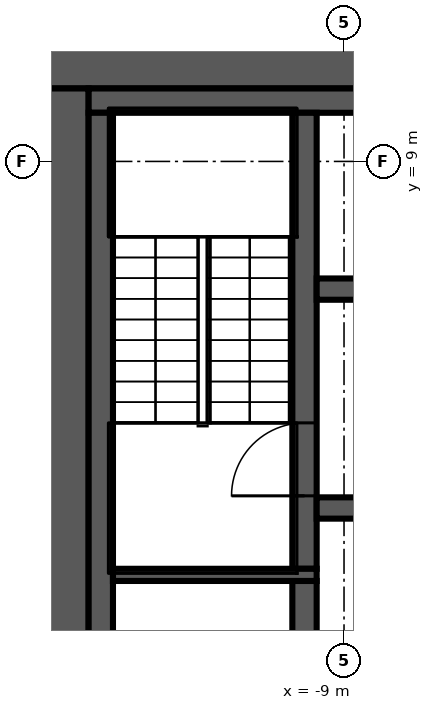
"""IFC4 building model, lengths in metres.
Left out: names, types, materials, properties, quantities, classifications, styles, units other than length and angle.
Written with IfcOpenShell. Run it as: python <this file> out.ifc"""

import sys

from ifc_helpers import new_model, si_unit, direction, frame, frame_2d, origin, place, context, subcontext, project, spatial, rectangle, extrude, element, fill, save


model = new_model("IFC4")
c1 = context("Model", 3, precision=1e-05, world=origin(), true_north=direction((0.0, 1.0)))
c2 = subcontext(c1, "Body", "Model", "MODEL_VIEW")
j1 = project(units=[si_unit("LENGTHUNIT", "METRE"), si_unit("PLANEANGLEUNIT", "RADIAN")], contexts=[c1])
p1 = place(None, origin())
s1 = spatial("IfcSite", under=j1, at=p1, CompositionType="ELEMENT")
p2 = place(p1, origin())
s2 = spatial("IfcBuilding", under=s1, at=p2, CompositionType="ELEMENT")
p3 = place(p2, frame((0.0, 0.0, 151.6)))
s3 = spatial("IfcBuildingStorey", under=s2, at=p3, CompositionType="ELEMENT", Elevation=151.6)
p4 = place(p3, frame((-14.0, 10.6, 0.0), z_axis=(0.0, 0.0, 1.0), x_axis=(1.0, 0.0, 0.0)))
e1 = element("IfcWall", 1, at=p4, inside=s3, PredefinedType="SHEAR", context=c2, shape_type="SweptSolid", body=[
    extrude(rectangle(XDim=28.0, YDim=0.8, at=frame_2d((14.0, 0.0))), origin(), (0.0, 0.0, 1.0), 6.62),
])
p5 = place(p4, frame((15.9, 0.0, 0.0)))
e2 = element("IfcOpeningElement", 2, at=p5, cuts=e1, PredefinedType="OPENING", context=c2, shape_type="SweptSolid", body=[
    extrude(rectangle(XDim=1.6, YDim=2.1, at=frame_2d((0.8, 1.05))), frame((0.0, 0.41, 0.0), z_axis=(0.0, -1.0, 0.0), x_axis=(1.0, 0.0, 0.0)), (0.0, 0.0, 1.0), 0.82),
])
p6 = place(p3, frame((-13.6, -10.2, 0.0), z_axis=(0.0, 0.0, 1.0), x_axis=(0.0, 1.0, 0.0)))
e3 = element("IfcWall", 3, at=p6, inside=s3, PredefinedType="SHEAR", context=c2, shape_type="SweptSolid", body=[
    extrude(rectangle(XDim=20.4, YDim=0.8, at=frame_2d((10.2, 0.0))), origin(), (0.0, 0.0, 1.0), 6.62),
])
p7 = place(p3, frame((-13.2, 10.0, 0.0), z_axis=(0.0, 0.0, 1.0), x_axis=(1.0, 0.0, 0.0)))
e4 = element("IfcWall", 4, at=p7, inside=s3, PredefinedType="SHEAR", context=c2, shape_type="SweptSolid", body=[
    extrude(rectangle(XDim=14.7, YDim=0.4, at=frame_2d((7.35, 0.0))), origin(), (0.0, 0.0, 1.0), 6.62),
])
p8 = place(p3, frame((-13.0, -9.8, 0.0), z_axis=(0.0, 0.0, 1.0), x_axis=(0.0, 1.0, 0.0)))
e5 = element("IfcWall", 5, at=p8, inside=s3, PredefinedType="SHEAR", context=c2, shape_type="SweptSolid", body=[
    extrude(rectangle(XDim=19.6, YDim=0.4, at=frame_2d((9.8, 0.0))), origin(), (0.0, 0.0, 1.0), 6.62),
])
p9 = place(p3, frame((-9.65, -2.1, 0.0), z_axis=(0.0, 0.0, 1.0), x_axis=(0.0, 1.0, 0.0)))
e6 = element("IfcWall", 6, at=p9, inside=s3, PredefinedType="SHEAR", context=c2, shape_type="SweptSolid", body=[
    extrude(rectangle(XDim=4.2, YDim=0.4, at=frame_2d((2.1, 0.0))), origin(), (0.0, 0.0, 1.0), 6.62),
])
p10 = place(p3, frame((-9.65, 2.3, 0.0), z_axis=(0.0, 0.0, 1.0), x_axis=(0.0, 1.0, 0.0)))
e7 = element("IfcWall", 7, at=p10, inside=s3, PredefinedType="SHEAR", context=c2, shape_type="SweptSolid", body=[
    extrude(rectangle(XDim=7.5, YDim=0.4, at=frame_2d((3.75, 0.0))), origin(), (0.0, 0.0, 1.0), 6.62),
])
p11 = place(p10, frame((1.2, 0.0, 0.0)))
e8 = element("IfcOpeningElement", 8, at=p11, cuts=e7, PredefinedType="OPENING", context=c2, shape_type="SweptSolid", body=[
    extrude(rectangle(XDim=1.2, YDim=2.1, at=frame_2d((0.6, 1.05))), frame((0.0, 0.21, 0.0), z_axis=(0.0, -1.0, 0.0), x_axis=(1.0, 0.0, 0.0)), (0.0, 0.0, 1.0), 0.42),
])
p12 = place(p3, frame((-9.45, 2.2, 0.0), z_axis=(0.0, 0.0, 1.0), x_axis=(-1.0, 0.0, 0.0)))
e9 = element("IfcWall", 9, at=p12, inside=s3, PredefinedType="SHEAR", context=c2, shape_type="SweptSolid", body=[
    extrude(rectangle(XDim=3.35, YDim=0.2, at=frame_2d((1.675, 0.0))), origin(), (0.0, 0.0, 1.0), 6.62),
])
p13 = place(p3, frame((-9.45, 6.9, 0.0), z_axis=(0.0, 0.0, 1.0), x_axis=(1.0, 0.0, 0.0)))
e10 = element("IfcWall", 10, at=p13, inside=s3, PredefinedType="SHEAR", context=c2, shape_type="SweptSolid", body=[
    extrude(rectangle(XDim=18.9, YDim=0.35, at=frame_2d((9.45, 0.0))), origin(), (0.0, 0.0, 1.0), 6.62),
])
p14 = place(p13, frame((11.55, 0.0, 0.0)))
e11 = element("IfcOpeningElement", 11, at=p14, cuts=e10, PredefinedType="OPENING", context=c2, shape_type="SweptSolid", body=[
    extrude(rectangle(XDim=1.2, YDim=2.1, at=frame_2d((0.6, 1.05))), frame((0.0, 0.185, 0.0), z_axis=(0.0, -1.0, 0.0), x_axis=(1.0, 0.0, 0.0)), (0.0, 0.0, 1.0), 0.37),
])
p15 = place(p13, frame((14.3, 0.0, 0.0)))
e12 = element("IfcOpeningElement", 12, at=p15, cuts=e10, PredefinedType="OPENING", context=c2, shape_type="SweptSolid", body=[
    extrude(rectangle(XDim=1.1, YDim=2.1, at=frame_2d((0.55, 1.05))), frame((0.0, 0.185, 0.0), z_axis=(0.0, -1.0, 0.0), x_axis=(1.0, 0.0, 0.0)), (0.0, 0.0, 1.0), 0.37),
])
p16 = place(p13, frame((17.0, 0.0, 0.0)))
e13 = element("IfcOpeningElement", 13, at=p16, cuts=e10, PredefinedType="OPENING", context=c2, shape_type="SweptSolid", body=[
    extrude(rectangle(XDim=1.1, YDim=2.1, at=frame_2d((0.55, 1.05))), frame((0.0, 0.185, 0.0), z_axis=(0.0, -1.0, 0.0), x_axis=(1.0, 0.0, 0.0)), (0.0, 0.0, 1.0), 0.37),
])
p17 = place(p3, frame((9.45, 3.3, 0.0), z_axis=(0.0, 0.0, 1.0), x_axis=(-1.0, 0.0, 0.0)))
e14 = element("IfcWall", 14, at=p17, inside=s3, PredefinedType="SHEAR", context=c2, shape_type="SweptSolid", body=[
    extrude(rectangle(XDim=18.9, YDim=0.35, at=frame_2d((9.45, 0.0))), origin(), (0.0, 0.0, 1.0), 6.62),
])
p18 = place(p17, frame((6.2, 0.0, 0.0)))
e15 = element("IfcOpeningElement", 15, at=p18, cuts=e14, PredefinedType="OPENING", context=c2, shape_type="SweptSolid", body=[
    extrude(rectangle(XDim=1.1, YDim=2.1, at=frame_2d((0.55, 1.05))), frame((0.0, 0.185, 0.0), z_axis=(0.0, -1.0, 0.0), x_axis=(1.0, 0.0, 0.0)), (0.0, 0.0, 1.0), 0.37),
])
p19 = place(p17, frame((3.5, 0.0, 0.0)))
e16 = element("IfcOpeningElement", 16, at=p19, cuts=e14, PredefinedType="OPENING", context=c2, shape_type="SweptSolid", body=[
    extrude(rectangle(XDim=1.1, YDim=2.1, at=frame_2d((0.55, 1.05))), frame((0.0, 0.185, 0.0), z_axis=(0.0, -1.0, 0.0), x_axis=(1.0, 0.0, 0.0)), (0.0, 0.0, 1.0), 0.37),
])
p20 = place(p17, frame((0.9, 0.0, 0.0)))
e17 = element("IfcOpeningElement", 17, at=p20, cuts=e14, PredefinedType="OPENING", context=c2, shape_type="SweptSolid", body=[
    extrude(rectangle(XDim=0.9, YDim=2.1, at=frame_2d((0.45, 1.05))), frame((0.0, 0.185, 0.0), z_axis=(0.0, -1.0, 0.0), x_axis=(1.0, 0.0, 0.0)), (0.0, 0.0, 1.0), 0.37),
])
p21 = place(p11, origin())
e18 = element("IfcDoor", 18, at=p21, inside=s3, OperationType="SINGLE_SWING_RIGHT", PredefinedType="DOOR", context=c2, shape_type="SweptSolid", body=[
    extrude(rectangle(XDim=1.2, YDim=2.1, at=frame_2d((0.6, 1.05))), frame((0.0, 0.025, 0.0), z_axis=(0.0, -1.0, 0.0), x_axis=(1.0, 0.0, 0.0)), (0.0, 0.0, 1.0), 0.05),
])
fill(e8, e18)
save(model, sys.argv[1])
